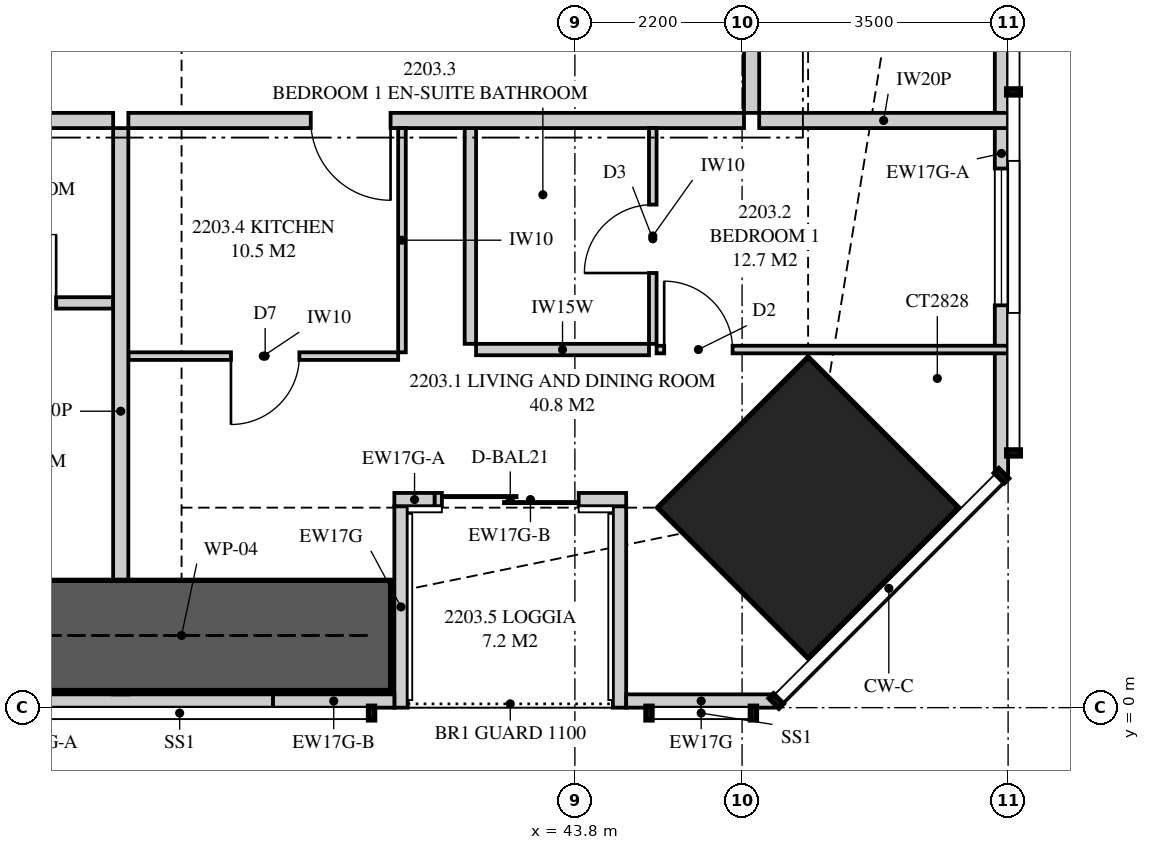
"""IFC4 building model, lengths in metres.
Left out: names, types, materials, properties, quantities, classifications, styles, units other than length and angle.
Written with IfcOpenShell. Run it as: python <this file> out.ifc"""

import sys

from ifc_helpers import new_model, si_unit, direction, frame, frame_2d, origin, origin_2d, place, context, subcontext, project, spatial, polyline, rectangle, hollow_rectangle, outline, extrude, element, fill, save


model = new_model("IFC4")
c1 = context("Model", 3, precision=1e-05, world=origin(), true_north=direction((0.0, 1.0)))
c2 = subcontext(c1, "Body", "Model", "MODEL_VIEW")
j1 = project(units=[si_unit("LENGTHUNIT", "METRE"), si_unit("PLANEANGLEUNIT", "RADIAN")], contexts=[c1])
p1 = place(None, origin())
s1 = spatial("IfcSite", under=j1, at=p1, CompositionType="ELEMENT")
p2 = place(p1, origin())
s2 = spatial("IfcBuilding", under=s1, at=p2, CompositionType="ELEMENT")
p3 = place(p2, frame((0.0, 0.0, 84.75)))
s3 = spatial("IfcBuildingStorey", under=s2, at=p3, CompositionType="ELEMENT", Elevation=84.75)
p4 = place(p3, frame((46.869, 2.631, 0.0), z_axis=(0.0, 0.0, 1.0), x_axis=(-0.707106781187, 0.707106781187, 0.0)))
e1 = element("IfcColumn", 1, at=p4, inside=s3, PredefinedType="COLUMN", context=c2, shape_type="SweptSolid", body=[
    extrude(hollow_rectangle(XDim=2.8, YDim=2.8, WallThickness=0.25, at=origin_2d()), origin(), (0.0, 0.0, 1.0), 3.35),
])
p5 = place(p3, frame((33.6, 0.087, 0.0), z_axis=(0.0, 0.0, 1.0), x_axis=(1.0, 0.0, 0.0)))
e2 = element("IfcWall", 2, at=p5, inside=s3, PredefinedType="SOLIDWALL", context=c2, shape_type="SweptSolid", body=[
    extrude(rectangle(XDim=6.229, YDim=0.175, at=frame_2d((3.115, 0.0))), origin(), (0.0, 0.0, 1.0), 2.15),
])
p6 = place(p5, frame((0.375, 0.0, 0.4)))
e3 = element("IfcOpeningElement", 3, at=p6, cuts=e2, PredefinedType="OPENING", context=c2, shape_type="SweptSolid", body=[
    extrude(rectangle(XDim=1.8, YDim=1.7, at=frame_2d((0.9, 0.85))), frame((0.0, 0.097, 0.0), z_axis=(0.0, -1.0, 0.0), x_axis=(1.0, 0.0, 0.0)), (0.0, 0.0, 1.0), 0.195),
])
p7 = place(p3, frame((39.829, 0.087, 0.0), z_axis=(0.0, 0.0, 1.0), x_axis=(1.0, 0.0, 0.0)))
e4 = element("IfcWall", 4, at=p7, inside=s3, PredefinedType="SOLIDWALL", context=c2, shape_type="SweptSolid", body=[
    extrude(rectangle(XDim=1.596, YDim=0.175, at=frame_2d((0.798, 0.0))), origin(), (0.0, 0.0, 1.0), 3.11),
])
p8 = place(p3, frame((44.475, 0.087, 0.0), z_axis=(0.0, 0.0, 1.0), x_axis=(1.0, 0.0, 0.0)))
e5 = element("IfcWall", 5, at=p8, inside=s3, PredefinedType="SOLIDWALL", context=c2, shape_type="SweptSolid", body=[
    extrude(rectangle(XDim=1.974, YDim=0.175, at=frame_2d((0.987, 0.0))), origin(), (0.0, 0.0, 1.0), 3.11),
])
p9 = place(p3, frame((41.425, 2.738, 0.0), z_axis=(0.0, 0.0, 1.0), x_axis=(1.0, 0.0, 0.0)))
e6 = element("IfcWall", 6, at=p9, inside=s3, PredefinedType="SOLIDWALL", context=c2, shape_type="SweptSolid", body=[
    extrude(rectangle(XDim=0.531, YDim=0.175, at=frame_2d((0.266, 0.0))), origin(), (0.0, 0.0, 1.0), 2.51),
])
p10 = place(p3, frame((41.956, 2.738, 0.0), z_axis=(0.0, 0.0, 1.0), x_axis=(1.0, 0.0, 0.0)))
e7 = element("IfcWall", 7, at=p10, inside=s3, PredefinedType="SOLIDWALL", context=c2, shape_type="SweptSolid", body=[
    extrude(rectangle(XDim=2.519, YDim=0.175, at=frame_2d((1.26, 0.0))), origin(), (0.0, 0.0, 1.0), 2.15),
])
p11 = place(p10, frame((0.094, 0.0, 0.0)))
e8 = element("IfcOpeningElement", 8, at=p11, cuts=e7, PredefinedType="OPENING", context=c2, shape_type="SweptSolid", body=[
    extrude(rectangle(XDim=1.8, YDim=2.1, at=frame_2d((0.9, 1.05))), frame((0.0, 0.097, 0.0), z_axis=(0.0, -1.0, 0.0), x_axis=(1.0, 0.0, 0.0)), (0.0, 0.0, 1.0), 0.195),
])
p12 = place(p3, frame((41.512, 0.0, 0.0), z_axis=(0.0, 0.0, 1.0), x_axis=(0.0, 1.0, 0.0)))
e9 = element("IfcWall", 9, at=p12, inside=s3, PredefinedType="SOLIDWALL", context=c2, shape_type="SweptSolid", body=[
    extrude(outline(polyline([(0.0, 0.0), (2.65, 0.0), (2.65, 2.51), (2.577, 2.51), (2.577, 2.15), (0.5, 2.15), (0.5, 3.11), (0.0, 3.11), (0.0, 0.0)])), frame((0.0, 0.087, 0.0), z_axis=(0.0, -1.0, 0.0), x_axis=(1.0, 0.0, 0.0)), (0.0, 0.0, 1.0), 0.175),
])
p13 = place(p3, frame((44.387, 0.0, 0.0), z_axis=(0.0, 0.0, 1.0), x_axis=(0.0, 1.0, 0.0)))
e10 = element("IfcWall", 10, at=p13, inside=s3, PredefinedType="SOLIDWALL", context=c2, shape_type="SweptSolid", body=[
    extrude(outline(polyline([(0.0, 0.0), (2.65, 0.0), (2.65, 2.15), (1.087, 2.15), (1.087, 3.11), (0.0, 3.11), (0.0, 0.0)])), frame((0.0, 0.087, 0.0), z_axis=(0.0, -1.0, 0.0), x_axis=(1.0, 0.0, 0.0)), (0.0, 0.0, 1.0), 0.175),
])
p14 = place(p3, frame((49.413, 3.051, 0.0), z_axis=(0.0, 0.0, 1.0), x_axis=(0.0, 1.0, 0.0)))
e11 = element("IfcWall", 11, at=p14, inside=s3, PredefinedType="SOLIDWALL", context=c2, shape_type="SweptSolid", body=[
    extrude(rectangle(XDim=8.481, YDim=0.175, at=frame_2d((4.24, 0.0))), origin(), (0.0, 0.0, 1.0), 3.11),
])
p15 = place(p14, frame((2.242, 0.0, 0.4)))
e12 = element("IfcOpeningElement", 12, at=p15, cuts=e11, PredefinedType="OPENING", context=c2, shape_type="SweptSolid", body=[
    extrude(rectangle(XDim=1.8, YDim=1.7, at=frame_2d((0.9, 0.85))), frame((0.0, 0.097, 0.0), z_axis=(0.0, -1.0, 0.0), x_axis=(1.0, 0.0, 0.0)), (0.0, 0.0, 1.0), 0.195),
])
p16 = place(p3, frame((37.825, 0.175, 0.0), z_axis=(0.0, 0.0, 1.0), x_axis=(0.0, 1.0, 0.0)))
e13 = element("IfcWall", 13, at=p16, inside=s3, PredefinedType="PARTITIONING", context=c2, shape_type="SweptSolid", body=[
    extrude(outline(polyline([(1.885, 2.15), (0.0, 2.15), (0.0, 0.266), (0.529, 0.266), (0.529, 0.684), (1.021, 0.684), (1.021, 0.266), (1.535, 0.266), (1.535, 0.0), (7.45, 0.0), (7.45, 3.11), (1.885, 3.11), (1.885, 2.15)]), holes=[polyline([(0.529, 1.016), (0.529, 1.924), (1.021, 1.924), (1.021, 1.016), (0.529, 1.016)])]), frame((0.0, 0.1, 0.0), z_axis=(0.0, -1.0, 0.0), x_axis=(1.0, 0.0, 0.0)), (0.0, 0.0, 1.0), 0.2),
])
p17 = place(p3, frame((29.9, 7.725, 0.0), z_axis=(0.0, 0.0, 1.0), x_axis=(1.0, 0.0, 0.0)))
e14 = element("IfcWall", 14, at=p17, inside=s3, PredefinedType="PARTITIONING", context=c2, shape_type="SweptSolid", body=[
    extrude(rectangle(XDim=7.825, YDim=0.2, at=frame_2d((3.913, 0.0))), origin(), (0.0, 0.0, 1.0), 3.11),
])
p18 = place(p17, frame((3.413, 0.0, 0.0)))
e15 = element("IfcOpeningElement", 15, at=p18, cuts=e14, PredefinedType="OPENING", context=c2, shape_type="SweptSolid", body=[
    extrude(rectangle(XDim=1.05, YDim=2.2, at=frame_2d((0.525, 1.1))), frame((0.0, 0.11, 0.0), z_axis=(0.0, -1.0, 0.0), x_axis=(1.0, 0.0, 0.0)), (0.0, 0.0, 1.0), 0.22),
])
p19 = place(p3, frame((35.3, 5.325, 0.0), z_axis=(0.0, 0.0, 1.0), x_axis=(1.0, 0.0, 0.0)))
e16 = element("IfcWall", 16, at=p19, inside=s3, PredefinedType="PLUMBINGWALL", context=c2, shape_type="SweptSolid", body=[
    extrude(rectangle(XDim=2.425, YDim=0.15, at=frame_2d((1.212, 0.0))), origin(), (0.0, 0.0, 1.0), 3.11),
])
p20 = place(p19, frame((0.775, 0.0, 0.0)))
e17 = element("IfcOpeningElement", 17, at=p20, cuts=e16, PredefinedType="OPENING", context=c2, shape_type="SweptSolid", body=[
    extrude(rectangle(XDim=0.9, YDim=2.1, at=frame_2d((0.45, 1.05))), frame((0.0, 0.085, 0.0), z_axis=(0.0, -1.0, 0.0), x_axis=(1.0, 0.0, 0.0)), (0.0, 0.0, 1.0), 0.17),
])
p21 = place(p3, frame((37.925, 7.725, 0.0), z_axis=(0.0, 0.0, 1.0), x_axis=(1.0, 0.0, 0.0)))
e18 = element("IfcWall", 18, at=p21, inside=s3, PredefinedType="PARTITIONING", context=c2, shape_type="SweptSolid", body=[
    extrude(outline(polyline([(0.0, 0.0), (8.1, 0.0), (8.1, 3.11), (1.046, 3.11), (1.046, 2.531), (0.354, 2.531), (0.354, 3.11), (0.0, 3.11), (0.0, 0.0)])), frame((0.0, 0.1, 0.0), z_axis=(0.0, -1.0, 0.0), x_axis=(1.0, 0.0, 0.0)), (0.0, 0.0, 1.0), 0.2),
])
p22 = place(p21, frame((2.4, 0.0, 0.0)))
e19 = element("IfcOpeningElement", 19, at=p22, cuts=e18, PredefinedType="OPENING", context=c2, shape_type="SweptSolid", body=[
    extrude(rectangle(XDim=1.05, YDim=2.2, at=frame_2d((0.525, 1.1))), frame((0.0, 0.11, 0.0), z_axis=(0.0, -1.0, 0.0), x_axis=(1.0, 0.0, 0.0)), (0.0, 0.0, 1.0), 0.22),
])
p23 = place(p3, frame((44.825, 4.786, 0.0), z_axis=(0.0, 0.0, 1.0), x_axis=(0.0, 1.0, 0.0)))
e20 = element("IfcWall", 20, at=p23, inside=s3, PredefinedType="PARTITIONING", context=c2, shape_type="SweptSolid", body=[
    extrude(rectangle(XDim=2.839, YDim=0.1, at=frame_2d((1.419, 0.0))), origin(), (0.0, 0.0, 1.0), 3.11),
])
p24 = place(p23, frame((0.932, 0.0, 0.0)))
e21 = element("IfcOpeningElement", 21, at=p24, cuts=e20, PredefinedType="OPENING", context=c2, shape_type="SweptSolid", body=[
    extrude(rectangle(XDim=0.9, YDim=2.1, at=frame_2d((0.45, 1.05))), frame((0.0, 0.06, 0.0), z_axis=(0.0, -1.0, 0.0), x_axis=(1.0, 0.0, 0.0)), (0.0, 0.0, 1.0), 0.12),
])
p25 = place(p3, frame((44.875, 4.711, 0.0), z_axis=(0.0, 0.0, 1.0), x_axis=(1.0, 0.0, 0.0)))
e22 = element("IfcWall", 22, at=p25, inside=s3, PredefinedType="PARTITIONING", context=c2, shape_type="SweptSolid", body=[
    extrude(outline(polyline([(0.0, 0.0), (4.625, 0.0), (4.625, 3.11), (3.405, 3.11), (3.405, 2.15), (1.257, 2.15), (1.257, 3.11), (0.0, 3.11), (0.0, 0.0)])), frame((0.0, 0.05, 0.0), z_axis=(0.0, -1.0, 0.0), x_axis=(1.0, 0.0, 0.0)), (0.0, 0.0, 1.0), 0.1),
])
p26 = place(p25, frame((0.1, 0.0, 0.0)))
e23 = element("IfcOpeningElement", 23, at=p26, cuts=e22, PredefinedType="OPENING", context=c2, shape_type="SweptSolid", body=[
    extrude(rectangle(XDim=0.9, YDim=2.1, at=frame_2d((0.45, 1.05))), frame((0.0, 0.06, 0.0), z_axis=(0.0, -1.0, 0.0), x_axis=(1.0, 0.0, 0.0)), (0.0, 0.0, 1.0), 0.12),
])
p27 = place(p3, frame((42.5, 4.711, 0.0), z_axis=(0.0, 0.0, 1.0), x_axis=(1.0, 0.0, 0.0)))
e24 = element("IfcWall", 24, at=p27, inside=s3, PredefinedType="PLUMBINGWALL", context=c2, shape_type="SweptSolid", body=[
    extrude(rectangle(XDim=2.275, YDim=0.15, at=frame_2d((1.137, 0.0))), origin(), (0.0, 0.0, 1.0), 3.11),
])
p28 = place(p3, frame((42.425, 4.786, 0.0), z_axis=(0.0, 0.0, 1.0), x_axis=(0.0, 1.0, 0.0)))
e25 = element("IfcWall", 25, at=p28, inside=s3, PredefinedType="PLUMBINGWALL", context=c2, shape_type="SweptSolid", body=[
    extrude(rectangle(XDim=2.839, YDim=0.15, at=frame_2d((1.419, 0.0))), origin(), (0.0, 0.0, 1.0), 3.11),
])
p29 = place(p3, frame((37.925, 4.625, 0.0), z_axis=(0.0, 0.0, 1.0), x_axis=(1.0, 0.0, 0.0)))
e26 = element("IfcWall", 26, at=p29, inside=s3, PredefinedType="PARTITIONING", context=c2, shape_type="SweptSolid", body=[
    extrude(outline(polyline([(0.0, 0.0), (3.55, 0.0), (3.55, 3.11), (0.996, 3.11), (0.996, 2.531), (0.404, 2.531), (0.404, 3.11), (0.0, 3.11), (0.0, 0.0)])), frame((0.0, 0.05, 0.0), z_axis=(0.0, -1.0, 0.0), x_axis=(1.0, 0.0, 0.0)), (0.0, 0.0, 1.0), 0.1),
])
p30 = place(p29, frame((1.35, 0.0, 0.0)))
e27 = element("IfcOpeningElement", 27, at=p30, cuts=e26, PredefinedType="OPENING", context=c2, shape_type="SweptSolid", body=[
    extrude(rectangle(XDim=0.9, YDim=2.1, at=frame_2d((0.45, 1.05))), frame((0.0, 0.06, 0.0), z_axis=(0.0, -1.0, 0.0), x_axis=(1.0, 0.0, 0.0)), (0.0, 0.0, 1.0), 0.12),
])
p31 = place(p3, frame((41.525, 4.675, 0.0), z_axis=(0.0, 0.0, 1.0), x_axis=(0.0, 1.0, 0.0)))
e28 = element("IfcWall", 28, at=p31, inside=s3, PredefinedType="PARTITIONING", context=c2, shape_type="SweptSolid", body=[
    extrude(rectangle(XDim=2.95, YDim=0.1, at=frame_2d((1.475, 0.0))), origin(), (0.0, 0.0, 1.0), 3.11),
])
p32 = place(p3, frame((46.225, 7.725, 0.0), z_axis=(0.0, 0.0, 1.0), x_axis=(1.0, 0.0, 0.0)))
e29 = element("IfcWall", 29, at=p32, inside=s3, PredefinedType="PARTITIONING", context=c2, shape_type="SweptSolid", body=[
    extrude(outline(polyline([(0.0, 0.0), (3.275, 0.0), (3.275, 3.11), (2.594, 3.11), (2.594, 2.15), (0.44, 2.15), (0.44, 2.531), (0.297, 2.531), (0.297, 3.11), (0.0, 3.11), (0.0, 0.0)])), frame((0.0, 0.1, 0.0), z_axis=(0.0, -1.0, 0.0), x_axis=(1.0, 0.0, 0.0)), (0.0, 0.0, 1.0), 0.2),
])
p33 = place(p3, frame((46.125, 7.825, 0.0), z_axis=(0.0, 0.0, 1.0), x_axis=(0.0, 1.0, 0.0)))
e30 = element("IfcWall", 30, at=p33, inside=s3, PredefinedType="PARTITIONING", context=c2, shape_type="SweptSolid", body=[
    extrude(outline(polyline([(0.0, 0.0), (8.475, 0.0), (8.475, 3.11), (5.521, 3.11), (5.521, 2.531), (4.829, 2.531), (4.829, 3.11), (0.0, 3.11), (0.0, 0.0)])), frame((0.0, 0.1, 0.0), z_axis=(0.0, -1.0, 0.0), x_axis=(1.0, 0.0, 0.0)), (0.0, 0.0, 1.0), 0.2),
])
p34 = place(p3, frame((35.875, 0.95, 0.0), z_axis=(0.0, 0.0, 1.0), x_axis=(1.0, 0.0, 0.0)))
e31 = element("IfcWall", 31, at=p34, inside=s3, PredefinedType="SHEAR", context=c2, shape_type="SweptSolid", body=[
    extrude(rectangle(XDim=5.5, YDim=1.45, at=frame_2d((2.75, 0.0))), origin(), (0.0, 0.0, 1.0), 3.35),
])
p35 = place(p11, origin())
e32 = element("IfcDoor", 32, at=p35, inside=s3, OperationType="SLIDING_TO_LEFT", PredefinedType="DOOR", context=c2, shape_type="SweptSolid", body=[
    extrude(rectangle(XDim=1.8, YDim=2.1, at=frame_2d((0.9, 1.05))), frame((0.0, 0.025, 0.0), z_axis=(0.0, -1.0, 0.0), x_axis=(1.0, 0.0, 0.0)), (0.0, 0.0, 1.0), 0.05),
])
fill(e8, e32)
p36 = place(p15, origin())
e33 = element("IfcWindow", 33, at=p36, inside=s3, PartitioningType="SINGLE_PANEL", PredefinedType="WINDOW", context=c2, shape_type="SweptSolid", body=[
    extrude(rectangle(XDim=1.8, YDim=1.7, at=frame_2d((0.9, 0.85))), frame((0.0, 0.03, 0.0), z_axis=(0.0, -1.0, 0.0), x_axis=(1.0, 0.0, 0.0)), (0.0, 0.0, 1.0), 0.06),
])
fill(e12, e33)
p37 = place(p20, origin())
e34 = element("IfcDoor", 34, at=p37, inside=s3, OperationType="SINGLE_SWING_RIGHT", PredefinedType="DOOR", context=c2, shape_type="SweptSolid", body=[
    extrude(rectangle(XDim=0.9, YDim=2.1, at=frame_2d((0.45, 1.05))), frame((0.0, 0.025, 0.0), z_axis=(0.0, -1.0, 0.0), x_axis=(1.0, 0.0, 0.0)), (0.0, 0.0, 1.0), 0.05),
])
fill(e17, e34)
p38 = place(p22, frame((1.05, 0.0, 0.0), z_axis=(0.0, 0.0, 1.0), x_axis=(-1.0, 0.0, 0.0)))
e35 = element("IfcDoor", 35, at=p38, inside=s3, OperationType="SINGLE_SWING_LEFT", PredefinedType="DOOR", context=c2, shape_type="SweptSolid", body=[
    extrude(rectangle(XDim=1.05, YDim=2.2, at=frame_2d((0.525, 1.1))), frame((0.0, 0.025, 0.0), z_axis=(0.0, -1.0, 0.0), x_axis=(1.0, 0.0, 0.0)), (0.0, 0.0, 1.0), 0.05),
])
fill(e19, e35)
p39 = place(p26, origin())
e36 = element("IfcDoor", 36, at=p39, inside=s3, OperationType="SINGLE_SWING_LEFT", PredefinedType="DOOR", context=c2, shape_type="SweptSolid", body=[
    extrude(rectangle(XDim=0.9, YDim=2.1, at=frame_2d((0.45, 1.05))), frame((0.0, 0.025, 0.0), z_axis=(0.0, -1.0, 0.0), x_axis=(1.0, 0.0, 0.0)), (0.0, 0.0, 1.0), 0.05),
])
fill(e23, e36)
p40 = place(p24, origin())
e37 = element("IfcDoor", 37, at=p40, inside=s3, OperationType="SINGLE_SWING_LEFT", PredefinedType="DOOR", context=c2, shape_type="SweptSolid", body=[
    extrude(rectangle(XDim=0.9, YDim=2.1, at=frame_2d((0.45, 1.05))), frame((0.0, 0.025, 0.0), z_axis=(0.0, -1.0, 0.0), x_axis=(1.0, 0.0, 0.0)), (0.0, 0.0, 1.0), 0.05),
])
fill(e21, e37)
p41 = place(p30, frame((0.9, 0.0, 0.0), z_axis=(0.0, 0.0, 1.0), x_axis=(-1.0, 0.0, 0.0)))
e38 = element("IfcDoor", 38, at=p41, inside=s3, OperationType="SINGLE_SWING_RIGHT", PredefinedType="DOOR", context=c2, shape_type="SweptSolid", body=[
    extrude(rectangle(XDim=0.9, YDim=2.1, at=frame_2d((0.45, 1.05))), frame((0.0, 0.025, 0.0), z_axis=(0.0, -1.0, 0.0), x_axis=(1.0, 0.0, 0.0)), (0.0, 0.0, 1.0), 0.05),
])
fill(e27, e38)
save(model, sys.argv[1])
